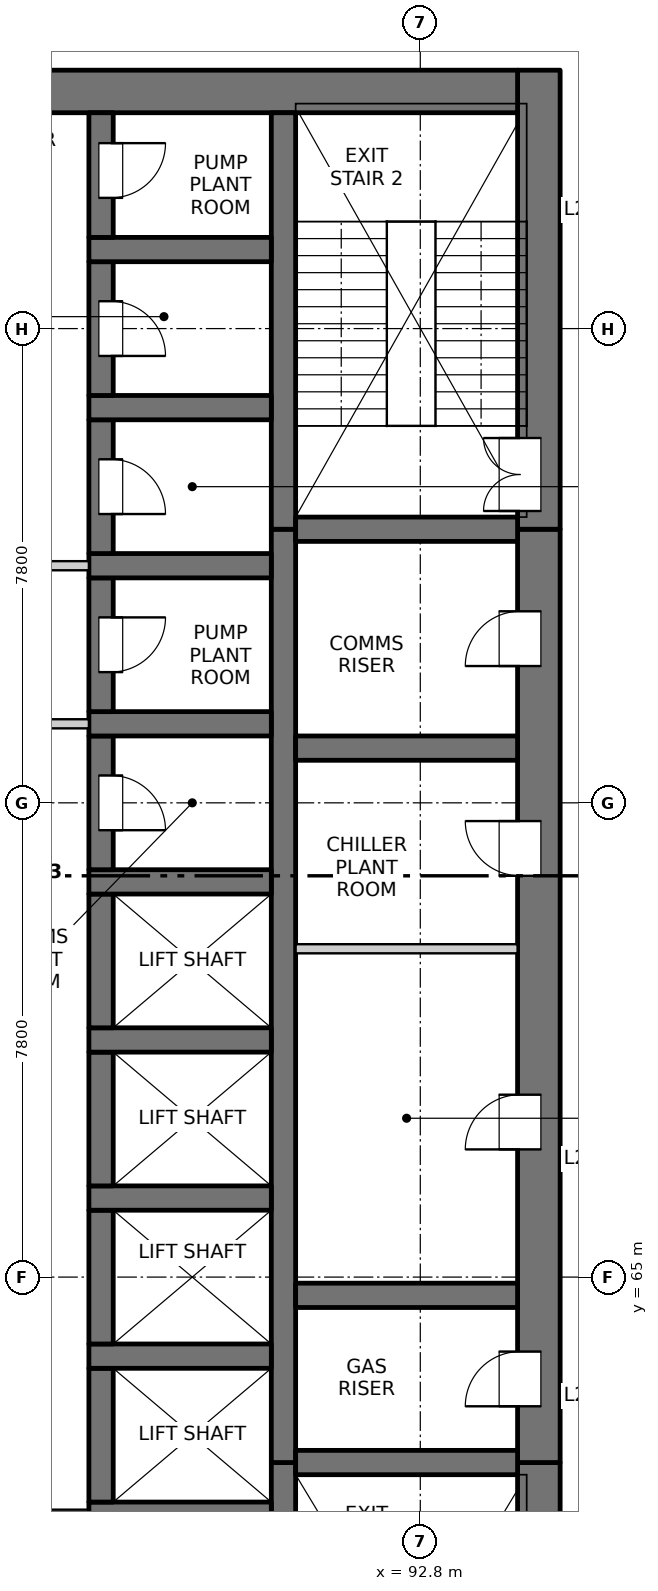
"""IFC4 building model, lengths in metres.
Left out: names, types, materials, properties, quantities, classifications, styles, units other than length and angle.
Written with IfcOpenShell. Run it as: python <this file> out.ifc"""

import sys

from ifc_helpers import new_model, si_unit, direction, frame, frame_2d, origin, place, context, subcontext, project, spatial, rectangle, extrude, element, fill, save


model = new_model("IFC4")
c1 = context("Model", 3, precision=1e-05, world=origin(), true_north=direction((0.0, 1.0)))
c2 = subcontext(c1, "Body", "Model", "MODEL_VIEW")
j1 = project(units=[si_unit("LENGTHUNIT", "METRE"), si_unit("PLANEANGLEUNIT", "RADIAN")], contexts=[c1])
p1 = place(None, origin())
s1 = spatial("IfcSite", under=j1, at=p1, CompositionType="ELEMENT")
p2 = place(p1, origin())
s2 = spatial("IfcBuilding", under=s1, at=p2, CompositionType="ELEMENT")
p3 = place(p2, frame((0.0, 0.0, 95.4)))
s3 = spatial("IfcBuildingStorey", under=s2, at=p3, CompositionType="ELEMENT", Elevation=95.4)
p4 = place(p3, frame((94.75, 54.9, -0.3), z_axis=(0.0, 0.0, 1.0), x_axis=(0.0, 1.0, 0.0)))
e1 = element("IfcWall", 1, at=p4, inside=s3, PredefinedType="SOLIDWALL", context=c2, shape_type="SweptSolid", body=[
    extrude(rectangle(XDim=7.05, YDim=0.7, at=frame_2d((3.525, 0.0))), origin(), (0.0, 0.0, 1.0), 4.5),
])
p5 = place(p4, frame((0.75, 0.0, 0.3)))
e2 = element("IfcOpeningElement", 2, at=p5, cuts=e1, PredefinedType="OPENING", context=c2, shape_type="SweptSolid", body=[
    extrude(rectangle(XDim=1.2, YDim=2.1, at=frame_2d((0.6, 1.05))), frame((0.0, 0.36, 0.0), z_axis=(0.0, -1.0, 0.0), x_axis=(1.0, 0.0, 0.0)), (0.0, 0.0, 1.0), 0.72),
])
p6 = place(p3, frame((94.75, 61.95, -0.3), z_axis=(0.0, 0.0, 1.0), x_axis=(0.0, 1.0, 0.0)))
e3 = element("IfcWall", 3, at=p6, inside=s3, PredefinedType="SOLIDWALL", context=c2, shape_type="SweptSolid", body=[
    extrude(rectangle(XDim=15.35, YDim=0.7, at=frame_2d((7.675, 0.0))), origin(), (0.0, 0.0, 1.0), 4.5),
])
p7 = place(p6, frame((0.925, 0.0, 0.3)))
e4 = element("IfcOpeningElement", 4, at=p7, cuts=e3, PredefinedType="OPENING", context=c2, shape_type="SweptSolid", body=[
    extrude(rectangle(XDim=0.9, YDim=2.1, at=frame_2d((0.45, 1.05))), frame((0.0, 0.36, 0.0), z_axis=(0.0, -1.0, 0.0), x_axis=(1.0, 0.0, 0.0)), (0.0, 0.0, 1.0), 0.72),
])
p8 = place(p6, frame((5.15, 0.0, 0.3)))
e5 = element("IfcOpeningElement", 5, at=p8, cuts=e3, PredefinedType="OPENING", context=c2, shape_type="SweptSolid", body=[
    extrude(rectangle(XDim=0.9, YDim=2.1, at=frame_2d((0.45, 1.05))), frame((0.0, 0.36, 0.0), z_axis=(0.0, -1.0, 0.0), x_axis=(1.0, 0.0, 0.0)), (0.0, 0.0, 1.0), 0.72),
])
p9 = place(p6, frame((9.65, 0.0, 0.3)))
e6 = element("IfcOpeningElement", 6, at=p9, cuts=e3, PredefinedType="OPENING", context=c2, shape_type="SweptSolid", body=[
    extrude(rectangle(XDim=0.9, YDim=2.1, at=frame_2d((0.45, 1.05))), frame((0.0, 0.36, 0.0), z_axis=(0.0, -1.0, 0.0), x_axis=(1.0, 0.0, 0.0)), (0.0, 0.0, 1.0), 0.72),
])
p10 = place(p6, frame((13.1, 0.0, 0.3)))
e7 = element("IfcOpeningElement", 7, at=p10, cuts=e3, PredefinedType="OPENING", context=c2, shape_type="SweptSolid", body=[
    extrude(rectangle(XDim=0.9, YDim=2.1, at=frame_2d((0.45, 1.05))), frame((0.0, 0.36, 0.0), z_axis=(0.0, -1.0, 0.0), x_axis=(1.0, 0.0, 0.0)), (0.0, 0.0, 1.0), 0.72),
])
p11 = place(p3, frame((94.75, 77.3, -0.3), z_axis=(0.0, 0.0, 1.0), x_axis=(0.0, 1.0, 0.0)))
e8 = element("IfcWall", 8, at=p11, inside=s3, PredefinedType="SOLIDWALL", context=c2, shape_type="SweptSolid", body=[
    extrude(rectangle(XDim=7.55, YDim=0.7, at=frame_2d((3.775, 0.0))), origin(), (0.0, 0.0, 1.0), 4.5),
])
p12 = place(p11, frame((0.3, 0.0, 0.3)))
e9 = element("IfcOpeningElement", 9, at=p12, cuts=e8, PredefinedType="OPENING", context=c2, shape_type="SweptSolid", body=[
    extrude(rectangle(XDim=1.2, YDim=2.1, at=frame_2d((0.6, 1.05))), frame((0.0, 0.36, 0.0), z_axis=(0.0, -1.0, 0.0), x_axis=(1.0, 0.0, 0.0)), (0.0, 0.0, 1.0), 0.72),
])
p13 = place(p3, frame((75.6, 84.5, -0.3), z_axis=(0.0, 0.0, 1.0), x_axis=(1.0, 0.0, 0.0)))
e10 = element("IfcWall", 10, at=p13, inside=s3, PredefinedType="SOLIDWALL", context=c2, shape_type="SweptSolid", body=[
    extrude(rectangle(XDim=18.8, YDim=0.7, at=frame_2d((9.4, 0.0))), origin(), (0.0, 0.0, 1.0), 4.5),
])
p14 = place(p3, frame((90.55, 55.6, -0.3), z_axis=(0.0, 0.0, 1.0), x_axis=(0.0, 1.0, 0.0)))
e11 = element("IfcWall", 11, at=p14, inside=s3, PredefinedType="SOLIDWALL", context=c2, shape_type="SweptSolid", body=[
    extrude(rectangle(XDim=6.35, YDim=0.4, at=frame_2d((3.175, 0.0))), origin(), (0.0, 0.0, 1.0), 4.5),
])
p15 = place(p14, frame((0.1, 0.0, 0.3)))
e12 = element("IfcOpeningElement", 12, at=p15, cuts=e11, PredefinedType="OPENING", context=c2, shape_type="SweptSolid", body=[
    extrude(rectangle(XDim=1.2, YDim=2.1, at=frame_2d((0.6, 1.05))), frame((0.0, 0.21, 0.0), z_axis=(0.0, -1.0, 0.0), x_axis=(1.0, 0.0, 0.0)), (0.0, 0.0, 1.0), 0.42),
])
p16 = place(p3, frame((90.55, 61.95, -0.3), z_axis=(0.0, 0.0, 1.0), x_axis=(0.0, 1.0, 0.0)))
e13 = element("IfcWall", 13, at=p16, inside=s3, PredefinedType="SOLIDWALL", context=c2, shape_type="SweptSolid", body=[
    extrude(rectangle(XDim=15.35, YDim=0.4, at=frame_2d((7.675, 0.0))), origin(), (0.0, 0.0, 1.0), 4.5),
])
p17 = place(p3, frame((90.55, 77.3, -0.3), z_axis=(0.0, 0.0, 1.0), x_axis=(0.0, 1.0, 0.0)))
e14 = element("IfcWall", 14, at=p17, inside=s3, PredefinedType="SOLIDWALL", context=c2, shape_type="SweptSolid", body=[
    extrude(rectangle(XDim=6.85, YDim=0.4, at=frame_2d((3.425, 0.0))), origin(), (0.0, 0.0, 1.0), 4.5),
])
p18 = place(p3, frame((87.35, 61.1, -0.3), z_axis=(0.0, 0.0, 1.0), x_axis=(1.0, 0.0, 0.0)))
e15 = element("IfcWall", 15, at=p18, inside=s3, PredefinedType="SOLIDWALL", context=c2, shape_type="SweptSolid", body=[
    extrude(rectangle(XDim=3.0, YDim=0.4, at=frame_2d((1.5, 0.0))), origin(), (0.0, 0.0, 1.0), 4.5),
])
p19 = place(p3, frame((87.55, 61.3, -0.3), z_axis=(0.0, 0.0, 1.0), x_axis=(0.0, 1.0, 0.0)))
e16 = element("IfcWall", 16, at=p19, inside=s3, PredefinedType="SOLIDWALL", context=c2, shape_type="SweptSolid", body=[
    extrude(rectangle(XDim=2.2, YDim=0.4, at=frame_2d((1.1, 0.0))), origin(), (0.0, 0.0, 1.0), 4.5),
])
p20 = place(p3, frame((87.35, 63.7, -0.3), z_axis=(0.0, 0.0, 1.0), x_axis=(1.0, 0.0, 0.0)))
e17 = element("IfcWall", 17, at=p20, inside=s3, PredefinedType="SOLIDWALL", context=c2, shape_type="SweptSolid", body=[
    extrude(rectangle(XDim=3.0, YDim=0.4, at=frame_2d((1.5, 0.0))), origin(), (0.0, 0.0, 1.0), 4.5),
])
p21 = place(p3, frame((87.55, 63.9, -0.3), z_axis=(0.0, 0.0, 1.0), x_axis=(0.0, 1.0, 0.0)))
e18 = element("IfcWall", 18, at=p21, inside=s3, PredefinedType="SOLIDWALL", context=c2, shape_type="SweptSolid", body=[
    extrude(rectangle(XDim=2.2, YDim=0.4, at=frame_2d((1.1, 0.0))), origin(), (0.0, 0.0, 1.0), 4.5),
])
p22 = place(p3, frame((87.35, 66.3, -0.3), z_axis=(0.0, 0.0, 1.0), x_axis=(1.0, 0.0, 0.0)))
e19 = element("IfcWall", 19, at=p22, inside=s3, PredefinedType="SOLIDWALL", context=c2, shape_type="SweptSolid", body=[
    extrude(rectangle(XDim=3.0, YDim=0.4, at=frame_2d((1.5, 0.0))), origin(), (0.0, 0.0, 1.0), 4.5),
])
p23 = place(p3, frame((87.55, 66.5, -0.3), z_axis=(0.0, 0.0, 1.0), x_axis=(0.0, 1.0, 0.0)))
e20 = element("IfcWall", 20, at=p23, inside=s3, PredefinedType="SOLIDWALL", context=c2, shape_type="SweptSolid", body=[
    extrude(rectangle(XDim=2.2, YDim=0.4, at=frame_2d((1.1, 0.0))), origin(), (0.0, 0.0, 1.0), 4.5),
])
p24 = place(p3, frame((87.35, 68.9, -0.3), z_axis=(0.0, 0.0, 1.0), x_axis=(1.0, 0.0, 0.0)))
e21 = element("IfcWall", 21, at=p24, inside=s3, PredefinedType="SOLIDWALL", context=c2, shape_type="SweptSolid", body=[
    extrude(rectangle(XDim=3.0, YDim=0.4, at=frame_2d((1.5, 0.0))), origin(), (0.0, 0.0, 1.0), 4.5),
])
p25 = place(p3, frame((87.55, 69.1, -0.3), z_axis=(0.0, 0.0, 1.0), x_axis=(0.0, 1.0, 0.0)))
e22 = element("IfcWall", 22, at=p25, inside=s3, PredefinedType="SOLIDWALL", context=c2, shape_type="SweptSolid", body=[
    extrude(rectangle(XDim=2.2, YDim=0.4, at=frame_2d((1.1, 0.0))), origin(), (0.0, 0.0, 1.0), 4.5),
])
p26 = place(p3, frame((87.35, 71.5, -0.3), z_axis=(0.0, 0.0, 1.0), x_axis=(1.0, 0.0, 0.0)))
e23 = element("IfcWall", 23, at=p26, inside=s3, PredefinedType="SOLIDWALL", context=c2, shape_type="SweptSolid", body=[
    extrude(rectangle(XDim=3.0, YDim=0.4, at=frame_2d((1.5, 0.0))), origin(), (0.0, 0.0, 1.0), 4.5),
])
p27 = place(p3, frame((87.55, 71.7, -0.3), z_axis=(0.0, 0.0, 1.0), x_axis=(0.0, 1.0, 0.0)))
e24 = element("IfcWall", 24, at=p27, inside=s3, PredefinedType="SOLIDWALL", context=c2, shape_type="SweptSolid", body=[
    extrude(rectangle(XDim=2.2, YDim=0.4, at=frame_2d((1.1, 0.0))), origin(), (0.0, 0.0, 1.0), 4.5),
])
p28 = place(p27, frame((0.65, 0.0, 0.3)))
e25 = element("IfcOpeningElement", 25, at=p28, cuts=e24, PredefinedType="OPENING", context=c2, shape_type="SweptSolid", body=[
    extrude(rectangle(XDim=0.9, YDim=2.1, at=frame_2d((0.45, 1.05))), frame((0.0, 0.21, 0.0), z_axis=(0.0, -1.0, 0.0), x_axis=(1.0, 0.0, 0.0)), (0.0, 0.0, 1.0), 0.42),
])
p29 = place(p3, frame((87.35, 74.1, -0.3), z_axis=(0.0, 0.0, 1.0), x_axis=(1.0, 0.0, 0.0)))
e26 = element("IfcWall", 26, at=p29, inside=s3, PredefinedType="SOLIDWALL", context=c2, shape_type="SweptSolid", body=[
    extrude(rectangle(XDim=3.0, YDim=0.4, at=frame_2d((1.5, 0.0))), origin(), (0.0, 0.0, 1.0), 4.5),
])
p30 = place(p3, frame((87.55, 74.3, -0.3), z_axis=(0.0, 0.0, 1.0), x_axis=(0.0, 1.0, 0.0)))
e27 = element("IfcWall", 27, at=p30, inside=s3, PredefinedType="SOLIDWALL", context=c2, shape_type="SweptSolid", body=[
    extrude(rectangle(XDim=2.2, YDim=0.4, at=frame_2d((1.1, 0.0))), origin(), (0.0, 0.0, 1.0), 4.5),
])
p31 = place(p30, frame((0.65, 0.0, 0.3)))
e28 = element("IfcOpeningElement", 28, at=p31, cuts=e27, PredefinedType="OPENING", context=c2, shape_type="SweptSolid", body=[
    extrude(rectangle(XDim=0.9, YDim=2.1, at=frame_2d((0.45, 1.05))), frame((0.0, 0.21, 0.0), z_axis=(0.0, -1.0, 0.0), x_axis=(1.0, 0.0, 0.0)), (0.0, 0.0, 1.0), 0.42),
])
p32 = place(p3, frame((87.35, 76.7, -0.3), z_axis=(0.0, 0.0, 1.0), x_axis=(1.0, 0.0, 0.0)))
e29 = element("IfcWall", 29, at=p32, inside=s3, PredefinedType="SOLIDWALL", context=c2, shape_type="SweptSolid", body=[
    extrude(rectangle(XDim=3.0, YDim=0.4, at=frame_2d((1.5, 0.0))), origin(), (0.0, 0.0, 1.0), 4.5),
])
p33 = place(p3, frame((87.55, 76.9, -0.3), z_axis=(0.0, 0.0, 1.0), x_axis=(0.0, 1.0, 0.0)))
e30 = element("IfcWall", 30, at=p33, inside=s3, PredefinedType="SOLIDWALL", context=c2, shape_type="SweptSolid", body=[
    extrude(rectangle(XDim=2.2, YDim=0.4, at=frame_2d((1.1, 0.0))), origin(), (0.0, 0.0, 1.0), 4.5),
])
p34 = place(p33, frame((0.65, 0.0, 0.3)))
e31 = element("IfcOpeningElement", 31, at=p34, cuts=e30, PredefinedType="OPENING", context=c2, shape_type="SweptSolid", body=[
    extrude(rectangle(XDim=0.9, YDim=2.1, at=frame_2d((0.45, 1.05))), frame((0.0, 0.21, 0.0), z_axis=(0.0, -1.0, 0.0), x_axis=(1.0, 0.0, 0.0)), (0.0, 0.0, 1.0), 0.42),
])
p35 = place(p3, frame((87.35, 79.3, -0.3), z_axis=(0.0, 0.0, 1.0), x_axis=(1.0, 0.0, 0.0)))
e32 = element("IfcWall", 32, at=p35, inside=s3, PredefinedType="SOLIDWALL", context=c2, shape_type="SweptSolid", body=[
    extrude(rectangle(XDim=3.0, YDim=0.4, at=frame_2d((1.5, 0.0))), origin(), (0.0, 0.0, 1.0), 4.5),
])
p36 = place(p3, frame((87.55, 79.5, -0.3), z_axis=(0.0, 0.0, 1.0), x_axis=(0.0, 1.0, 0.0)))
e33 = element("IfcWall", 33, at=p36, inside=s3, PredefinedType="SOLIDWALL", context=c2, shape_type="SweptSolid", body=[
    extrude(rectangle(XDim=2.2, YDim=0.4, at=frame_2d((1.1, 0.0))), origin(), (0.0, 0.0, 1.0), 4.5),
])
p37 = place(p36, frame((0.65, 0.0, 0.3)))
e34 = element("IfcOpeningElement", 34, at=p37, cuts=e33, PredefinedType="OPENING", context=c2, shape_type="SweptSolid", body=[
    extrude(rectangle(XDim=0.9, YDim=2.1, at=frame_2d((0.45, 1.05))), frame((0.0, 0.21, 0.0), z_axis=(0.0, -1.0, 0.0), x_axis=(1.0, 0.0, 0.0)), (0.0, 0.0, 1.0), 0.42),
])
p38 = place(p3, frame((87.35, 81.9, -0.3), z_axis=(0.0, 0.0, 1.0), x_axis=(1.0, 0.0, 0.0)))
e35 = element("IfcWall", 35, at=p38, inside=s3, PredefinedType="SOLIDWALL", context=c2, shape_type="SweptSolid", body=[
    extrude(rectangle(XDim=3.0, YDim=0.4, at=frame_2d((1.5, 0.0))), origin(), (0.0, 0.0, 1.0), 4.5),
])
p39 = place(p3, frame((87.55, 82.1, -0.3), z_axis=(0.0, 0.0, 1.0), x_axis=(0.0, 1.0, 0.0)))
e36 = element("IfcWall", 36, at=p39, inside=s3, PredefinedType="SOLIDWALL", context=c2, shape_type="SweptSolid", body=[
    extrude(rectangle(XDim=2.05, YDim=0.4, at=frame_2d((1.025, 0.0))), origin(), (0.0, 0.0, 1.0), 4.5),
])
p40 = place(p39, frame((0.65, 0.0, 0.3)))
e37 = element("IfcOpeningElement", 37, at=p40, cuts=e36, PredefinedType="OPENING", context=c2, shape_type="SweptSolid", body=[
    extrude(rectangle(XDim=0.9, YDim=2.1, at=frame_2d((0.45, 1.05))), frame((0.0, 0.21, 0.0), z_axis=(0.0, -1.0, 0.0), x_axis=(1.0, 0.0, 0.0)), (0.0, 0.0, 1.0), 0.42),
])
for number, where, z_axis, x_axis in (
    (38, (90.75, 61.95, -0.3), (0.0, 0.0, 1.0), (1.0, 0.0, 0.0)),
    (39, (90.75, 64.7, -0.3), (0.0, 0.0, 1.0), (1.0, 0.0, 0.0)),
    (40, (90.75, 73.7, -0.3), (0.0, 0.0, 1.0), (1.0, 0.0, 0.0)),
    (41, (90.75, 77.3, -0.3), (0.0, 0.0, 1.0), (1.0, 0.0, 0.0)),
):
    element("IfcWall", number, at=place(p3, frame(where, z_axis=z_axis, x_axis=x_axis)), inside=s3, PredefinedType="SOLIDWALL", context=c2, shape_type="SweptSolid", body=[
        extrude(rectangle(XDim=3.65, YDim=0.4, at=frame_2d((1.825, 0.0))), origin(), (0.0, 0.0, 1.0), 4.5),
    ])
p41 = place(p3, frame((82.65, 61.1, 0.0), z_axis=(0.0, 0.0, 1.0), x_axis=(1.0, 0.0, 0.0)))
e42 = element("IfcWall", 42, at=p41, inside=s3, PredefinedType="PARTITIONING", context=c2, shape_type="SweptSolid", body=[
    extrude(rectangle(XDim=4.7, YDim=0.15, at=frame_2d((2.35, 0.0))), origin(), (0.0, 0.0, 1.0), 4.2),
])
p42 = place(p41, frame((1.45, 0.0, 0.0)))
e43 = element("IfcOpeningElement", 43, at=p42, cuts=e42, PredefinedType="OPENING", context=c2, shape_type="SweptSolid", body=[
    extrude(rectangle(XDim=1.8, YDim=2.1, at=frame_2d((0.9, 1.05))), frame((0.0, 0.085, 0.0), z_axis=(0.0, -1.0, 0.0), x_axis=(1.0, 0.0, 0.0)), (0.0, 0.0, 1.0), 0.17),
])
p43 = place(p3, frame((90.75, 70.4, 0.0), z_axis=(0.0, 0.0, 1.0), x_axis=(1.0, 0.0, 0.0)))
e44 = element("IfcWall", 44, at=p43, inside=s3, PredefinedType="PARTITIONING", context=c2, shape_type="SweptSolid", body=[
    extrude(rectangle(XDim=3.65, YDim=0.15, at=frame_2d((1.825, 0.0))), origin(), (0.0, 0.0, 1.0), 4.2),
])
p44 = place(p3, frame((82.65, 74.1, 0.0), z_axis=(0.0, 0.0, 1.0), x_axis=(1.0, 0.0, 0.0)))
e45 = element("IfcWall", 45, at=p44, inside=s3, PredefinedType="PARTITIONING", context=c2, shape_type="SweptSolid", body=[
    extrude(rectangle(XDim=4.7, YDim=0.15, at=frame_2d((2.35, 0.0))), origin(), (0.0, 0.0, 1.0), 4.2),
])
p45 = place(p44, frame((1.45, 0.0, 0.0)))
e46 = element("IfcOpeningElement", 46, at=p45, cuts=e45, PredefinedType="OPENING", context=c2, shape_type="SweptSolid", body=[
    extrude(rectangle(XDim=1.8, YDim=2.1, at=frame_2d((0.9, 1.05))), frame((0.0, 0.085, 0.0), z_axis=(0.0, -1.0, 0.0), x_axis=(1.0, 0.0, 0.0)), (0.0, 0.0, 1.0), 0.17),
])
p46 = place(p3, frame((82.65, 76.7, 0.0), z_axis=(0.0, 0.0, 1.0), x_axis=(1.0, 0.0, 0.0)))
e47 = element("IfcWall", 47, at=p46, inside=s3, PredefinedType="PARTITIONING", context=c2, shape_type="SweptSolid", body=[
    extrude(rectangle(XDim=4.7, YDim=0.15, at=frame_2d((2.35, 0.0))), origin(), (0.0, 0.0, 1.0), 4.2),
])
p47 = place(p46, frame((1.45, 0.0, 0.0)))
e48 = element("IfcOpeningElement", 48, at=p47, cuts=e47, PredefinedType="OPENING", context=c2, shape_type="SweptSolid", body=[
    extrude(rectangle(XDim=1.8, YDim=2.1, at=frame_2d((0.9, 1.05))), frame((0.0, 0.085, 0.0), z_axis=(0.0, -1.0, 0.0), x_axis=(1.0, 0.0, 0.0)), (0.0, 0.0, 1.0), 0.17),
])
p48 = place(p7, origin())
e49 = element("IfcDoor", 49, at=p48, inside=s3, OperationType="SINGLE_SWING_LEFT", PredefinedType="DOOR", context=c2, shape_type="SweptSolid", body=[
    extrude(rectangle(XDim=0.9, YDim=2.1, at=frame_2d((0.45, 1.05))), frame((0.0, 0.335, 0.0), z_axis=(0.0, -1.0, 0.0), x_axis=(1.0, 0.0, 0.0)), (0.0, 0.0, 1.0), 0.05),
])
fill(e4, e49)
p49 = place(p8, origin())
e50 = element("IfcDoor", 50, at=p49, inside=s3, OperationType="SINGLE_SWING_LEFT", PredefinedType="DOOR", context=c2, shape_type="SweptSolid", body=[
    extrude(rectangle(XDim=0.9, YDim=2.1, at=frame_2d((0.45, 1.05))), frame((0.0, 0.335, 0.0), z_axis=(0.0, -1.0, 0.0), x_axis=(1.0, 0.0, 0.0)), (0.0, 0.0, 1.0), 0.05),
])
fill(e5, e50)
p50 = place(p9, origin())
e51 = element("IfcDoor", 51, at=p50, inside=s3, OperationType="SINGLE_SWING_RIGHT", PredefinedType="DOOR", context=c2, shape_type="SweptSolid", body=[
    extrude(rectangle(XDim=0.9, YDim=2.1, at=frame_2d((0.45, 1.05))), frame((0.0, 0.335, 0.0), z_axis=(0.0, -1.0, 0.0), x_axis=(1.0, 0.0, 0.0)), (0.0, 0.0, 1.0), 0.05),
])
fill(e6, e51)
p51 = place(p28, origin())
e52 = element("IfcDoor", 52, at=p51, inside=s3, OperationType="SINGLE_SWING_RIGHT", PredefinedType="DOOR", context=c2, shape_type="SweptSolid", body=[
    extrude(rectangle(XDim=0.9, YDim=2.1, at=frame_2d((0.45, 1.05))), frame((0.0, -0.135, 0.0), z_axis=(0.0, -1.0, 0.0), x_axis=(1.0, 0.0, 0.0)), (0.0, 0.0, 1.0), 0.05),
])
fill(e25, e52)
p52 = place(p31, origin())
e53 = element("IfcDoor", 53, at=p52, inside=s3, OperationType="SINGLE_SWING_LEFT", PredefinedType="DOOR", context=c2, shape_type="SweptSolid", body=[
    extrude(rectangle(XDim=0.9, YDim=2.1, at=frame_2d((0.45, 1.05))), frame((0.0, -0.135, 0.0), z_axis=(0.0, -1.0, 0.0), x_axis=(1.0, 0.0, 0.0)), (0.0, 0.0, 1.0), 0.05),
])
fill(e28, e53)
p53 = place(p10, origin())
e54 = element("IfcDoor", 54, at=p53, inside=s3, OperationType="SINGLE_SWING_LEFT", PredefinedType="DOOR", context=c2, shape_type="SweptSolid", body=[
    extrude(rectangle(XDim=0.9, YDim=2.1, at=frame_2d((0.45, 1.05))), frame((0.0, 0.335, 0.0), z_axis=(0.0, -1.0, 0.0), x_axis=(1.0, 0.0, 0.0)), (0.0, 0.0, 1.0), 0.05),
])
fill(e7, e54)
p54 = place(p34, origin())
e55 = element("IfcDoor", 55, at=p54, inside=s3, OperationType="SINGLE_SWING_RIGHT", PredefinedType="DOOR", context=c2, shape_type="SweptSolid", body=[
    extrude(rectangle(XDim=0.9, YDim=2.1, at=frame_2d((0.45, 1.05))), frame((0.0, -0.135, 0.0), z_axis=(0.0, -1.0, 0.0), x_axis=(1.0, 0.0, 0.0)), (0.0, 0.0, 1.0), 0.05),
])
fill(e31, e55)
p55 = place(p12, origin())
e56 = element("IfcDoor", 56, at=p55, inside=s3, OperationType="DOUBLE_DOOR_SINGLE_SWING", PredefinedType="DOOR", context=c2, shape_type="SweptSolid", body=[
    extrude(rectangle(XDim=1.2, YDim=2.1, at=frame_2d((0.6, 1.05))), frame((0.0, 0.335, 0.0), z_axis=(0.0, -1.0, 0.0), x_axis=(1.0, 0.0, 0.0)), (0.0, 0.0, 1.0), 0.05),
])
fill(e9, e56)
p56 = place(p37, origin())
e57 = element("IfcDoor", 57, at=p56, inside=s3, OperationType="SINGLE_SWING_RIGHT", PredefinedType="DOOR", context=c2, shape_type="SweptSolid", body=[
    extrude(rectangle(XDim=0.9, YDim=2.1, at=frame_2d((0.45, 1.05))), frame((0.0, -0.135, 0.0), z_axis=(0.0, -1.0, 0.0), x_axis=(1.0, 0.0, 0.0)), (0.0, 0.0, 1.0), 0.05),
])
fill(e34, e57)
p57 = place(p40, origin())
e58 = element("IfcDoor", 58, at=p57, inside=s3, OperationType="SINGLE_SWING_LEFT", PredefinedType="DOOR", context=c2, shape_type="SweptSolid", body=[
    extrude(rectangle(XDim=0.9, YDim=2.1, at=frame_2d((0.45, 1.05))), frame((0.0, -0.135, 0.0), z_axis=(0.0, -1.0, 0.0), x_axis=(1.0, 0.0, 0.0)), (0.0, 0.0, 1.0), 0.05),
])
fill(e37, e58)
save(model, sys.argv[1])
